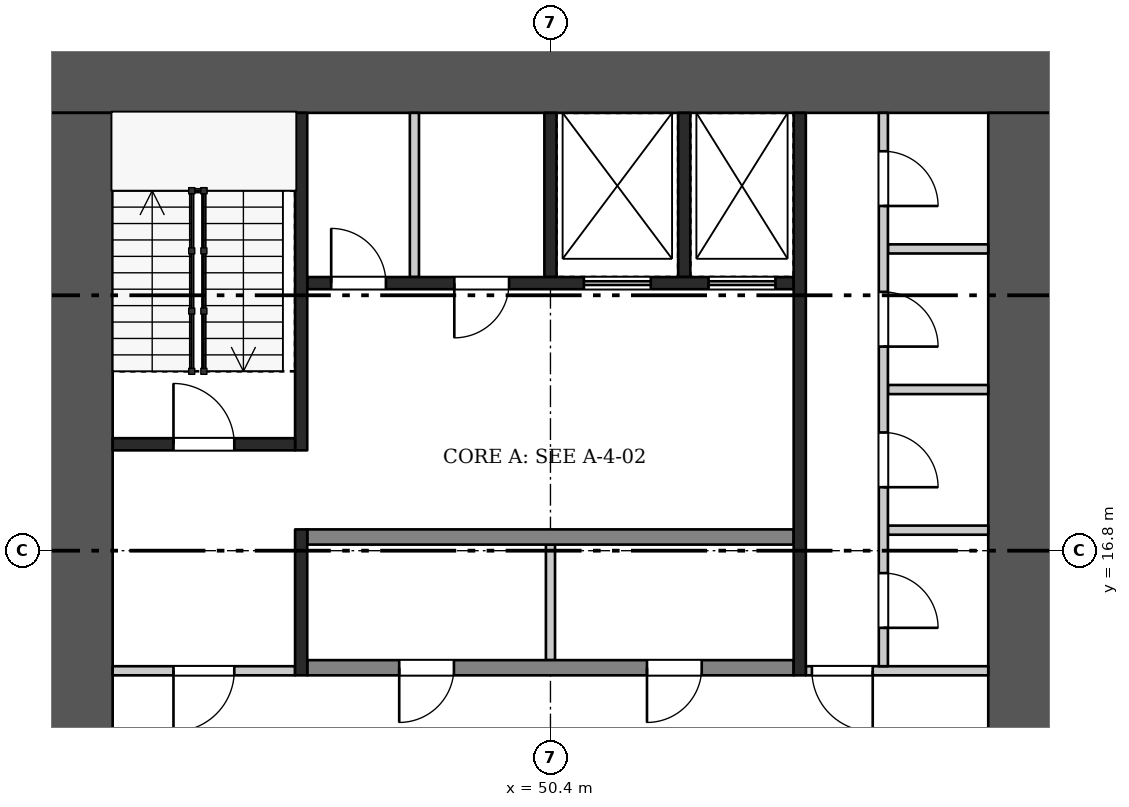
"""IFC4 building model, lengths in metres.
Left out: names, types, materials, properties, quantities, classifications, styles, units other than length and angle.
Written with IfcOpenShell. Run it as: python <this file> out.ifc"""

import sys

from ifc_helpers import new_model, si_unit, direction, frame, frame_2d, origin, place, context, subcontext, project, spatial, rectangle, extrude, element, fill, save


model = new_model("IFC4")
c1 = context("Model", 3, precision=1e-05, world=origin(), true_north=direction((0.0, 1.0)))
c2 = subcontext(c1, "Body", "Model", "MODEL_VIEW")
j1 = project(units=[si_unit("LENGTHUNIT", "METRE"), si_unit("PLANEANGLEUNIT", "RADIAN")], contexts=[c1])
p1 = place(None, origin())
s1 = spatial("IfcSite", under=j1, at=p1, CompositionType="ELEMENT")
p2 = place(p1, origin())
s2 = spatial("IfcBuilding", under=s1, at=p2, CompositionType="ELEMENT")
p3 = place(p2, frame((0.0, 0.0, -12.0)))
s3 = spatial("IfcBuildingStorey", under=s2, at=p3, CompositionType="ELEMENT", Elevation=-12.0)
p4 = place(p3, frame((42.0, 24.6, 0.0), z_axis=(0.0, 0.0, 1.0), x_axis=(1.0, 0.0, 0.0)))
e1 = element("IfcWall", 1, at=p4, inside=s3, PredefinedType="SHEAR", context=c2, shape_type="SweptSolid", body=[
    extrude(rectangle(XDim=16.8, YDim=1.2, at=frame_2d((8.4, 0.0))), origin(), (0.0, 0.0, 1.0), 3.7),
])
p5 = place(p3, frame((42.6, 9.6, 0.0), z_axis=(0.0, 0.0, 1.0), x_axis=(0.0, 1.0, 0.0)))
e2 = element("IfcWall", 2, at=p5, inside=s3, PredefinedType="SHEAR", context=c2, shape_type="SweptSolid", body=[
    extrude(rectangle(XDim=14.4, YDim=1.2, at=frame_2d((7.2, 0.0))), origin(), (0.0, 0.0, 1.0), 3.7),
])
p6 = place(p5, frame((2.1, 0.0, 0.0)))
e3 = element("IfcOpeningElement", 3, at=p6, cuts=e2, PredefinedType="OPENING", context=c2, shape_type="SweptSolid", body=[
    extrude(rectangle(XDim=1.8, YDim=2.1, at=frame_2d((0.9, 1.05))), frame((0.0, 0.61, 0.0), z_axis=(0.0, -1.0, 0.0), x_axis=(1.0, 0.0, 0.0)), (0.0, 0.0, 1.0), 1.22),
])
p7 = place(p3, frame((58.2, 9.6, 0.0), z_axis=(0.0, 0.0, 1.0), x_axis=(0.0, 1.0, 0.0)))
e4 = element("IfcWall", 4, at=p7, inside=s3, PredefinedType="SHEAR", context=c2, shape_type="SweptSolid", body=[
    extrude(rectangle(XDim=14.4, YDim=1.2, at=frame_2d((7.2, 0.0))), origin(), (0.0, 0.0, 1.0), 3.7),
])
p8 = place(p7, frame((2.1, 0.0, 0.0)))
e5 = element("IfcOpeningElement", 5, at=p8, cuts=e4, PredefinedType="OPENING", context=c2, shape_type="SweptSolid", body=[
    extrude(rectangle(XDim=1.8, YDim=2.1, at=frame_2d((0.9, 1.05))), frame((0.0, 0.61, 0.0), z_axis=(0.0, -1.0, 0.0), x_axis=(1.0, 0.0, 0.0)), (0.0, 0.0, 1.0), 1.22),
])
p9 = place(p3, frame((50.4, 15.0, 0.0), z_axis=(0.0, 0.0, 1.0), x_axis=(0.0, 1.0, 0.0)))
e6 = element("IfcWall", 6, at=p9, inside=s3, PredefinedType="PARTITIONING", context=c2, shape_type="SweptSolid", body=[
    extrude(rectangle(XDim=1.9, YDim=0.15, at=frame_2d((0.95, 0.0))), origin(), (0.0, 0.0, 1.0), 3.7),
])
p10 = place(p3, frame((46.4, 14.875, 0.0), z_axis=(0.0, 0.0, 1.0), x_axis=(1.0, 0.0, 0.0)))
e7 = element("IfcWall", 7, at=p10, inside=s3, PredefinedType="SHEAR", context=c2, shape_type="SweptSolid", body=[
    extrude(rectangle(XDim=8.0, YDim=0.25, at=frame_2d((4.0, 0.0))), origin(), (0.0, 0.0, 1.0), 3.7),
])
p11 = place(p10, frame((1.512, 0.0, 0.0)))
e8 = element("IfcOpeningElement", 8, at=p11, cuts=e7, PredefinedType="OPENING", context=c2, shape_type="SweptSolid", body=[
    extrude(rectangle(XDim=0.9, YDim=2.1, at=frame_2d((0.45, 1.05))), frame((0.0, 0.135, 0.0), z_axis=(0.0, -1.0, 0.0), x_axis=(1.0, 0.0, 0.0)), (0.0, 0.0, 1.0), 0.27),
])
p12 = place(p10, frame((5.587, 0.0, 0.0)))
e9 = element("IfcOpeningElement", 9, at=p12, cuts=e7, PredefinedType="OPENING", context=c2, shape_type="SweptSolid", body=[
    extrude(rectangle(XDim=0.9, YDim=2.1, at=frame_2d((0.45, 1.05))), frame((0.0, 0.135, 0.0), z_axis=(0.0, -1.0, 0.0), x_axis=(1.0, 0.0, 0.0)), (0.0, 0.0, 1.0), 0.27),
])
p13 = place(p3, frame((46.4, 17.025, 0.0), z_axis=(0.0, 0.0, 1.0), x_axis=(1.0, 0.0, 0.0)))
e10 = element("IfcWall", 10, at=p13, inside=s3, PredefinedType="SHEAR", context=c2, shape_type="SweptSolid", body=[
    extrude(rectangle(XDim=8.0, YDim=0.25, at=frame_2d((4.0, 0.0))), origin(), (0.0, 0.0, 1.0), 3.7),
])
for number, where, z_axis, x_axis in (
    (11, (50.4, 21.3, 0.0), (0.0, 0.0, 1.0), (0.0, 1.0, 0.0)),
    (12, (52.6, 21.3, 0.0), (0.0, 0.0, 1.0), (0.0, 1.0, 0.0)),
):
    element("IfcWall", number, at=place(p3, frame(where, z_axis=z_axis, x_axis=x_axis)), inside=s3, PredefinedType="SHEAR", context=c2, shape_type="SweptSolid", body=[
        extrude(rectangle(XDim=2.7, YDim=0.2, at=frame_2d((1.35, 0.0))), origin(), (0.0, 0.0, 1.0), 3.7),
    ])
p14 = place(p3, frame((48.163, 21.3, 0.0), z_axis=(0.0, 0.0, 1.0), x_axis=(0.0, 1.0, 0.0)))
e13 = element("IfcWall", 13, at=p14, inside=s3, PredefinedType="PARTITIONING", context=c2, shape_type="SweptSolid", body=[
    extrude(rectangle(XDim=2.7, YDim=0.15, at=frame_2d((1.35, 0.0))), origin(), (0.0, 0.0, 1.0), 3.7),
])
p15 = place(p3, frame((46.4, 21.2, 0.0), z_axis=(0.0, 0.0, 1.0), x_axis=(1.0, 0.0, 0.0)))
e14 = element("IfcWall", 14, at=p15, inside=s3, PredefinedType="SHEAR", context=c2, shape_type="SweptSolid", body=[
    extrude(rectangle(XDim=8.0, YDim=0.2, at=frame_2d((4.0, 0.0))), origin(), (0.0, 0.0, 1.0), 3.7),
])
p16 = place(p15, frame((0.394, 0.0, 0.0)))
e15 = element("IfcOpeningElement", 15, at=p16, cuts=e14, PredefinedType="OPENING", context=c2, shape_type="SweptSolid", body=[
    extrude(rectangle(XDim=0.9, YDim=2.1, at=frame_2d((0.45, 1.05))), frame((0.0, 0.11, 0.0), z_axis=(0.0, -1.0, 0.0), x_axis=(1.0, 0.0, 0.0)), (0.0, 0.0, 1.0), 0.22),
])
p17 = place(p15, frame((2.419, 0.0, 0.0)))
e16 = element("IfcOpeningElement", 16, at=p17, cuts=e14, PredefinedType="OPENING", context=c2, shape_type="SweptSolid", body=[
    extrude(rectangle(XDim=0.9, YDim=2.1, at=frame_2d((0.45, 1.05))), frame((0.0, 0.11, 0.0), z_axis=(0.0, -1.0, 0.0), x_axis=(1.0, 0.0, 0.0)), (0.0, 0.0, 1.0), 0.22),
])
p18 = place(p15, frame((4.55, 0.0, 0.0)))
e17 = element("IfcOpeningElement", 17, at=p18, cuts=e14, PredefinedType="OPENING", context=c2, shape_type="SweptSolid", body=[
    extrude(rectangle(XDim=1.1, YDim=2.1, at=frame_2d((0.55, 1.05))), frame((0.0, 0.11, 0.0), z_axis=(0.0, -1.0, 0.0), x_axis=(1.0, 0.0, 0.0)), (0.0, 0.0, 1.0), 0.22),
])
p19 = place(p15, frame((6.6, 0.0, 0.0)))
e18 = element("IfcOpeningElement", 18, at=p19, cuts=e14, PredefinedType="OPENING", context=c2, shape_type="SweptSolid", body=[
    extrude(rectangle(XDim=1.1, YDim=2.1, at=frame_2d((0.55, 1.05))), frame((0.0, 0.11, 0.0), z_axis=(0.0, -1.0, 0.0), x_axis=(1.0, 0.0, 0.0)), (0.0, 0.0, 1.0), 0.22),
])
p20 = place(p3, frame((46.3, 14.75, 0.0), z_axis=(0.0, 0.0, 1.0), x_axis=(0.0, 1.0, 0.0)))
e19 = element("IfcWall", 19, at=p20, inside=s3, PredefinedType="SHEAR", context=c2, shape_type="SweptSolid", body=[
    extrude(rectangle(XDim=2.4, YDim=0.2, at=frame_2d((1.2, 0.0))), origin(), (0.0, 0.0, 1.0), 3.7),
])
p21 = place(p3, frame((46.3, 18.45, 0.0), z_axis=(0.0, 0.0, 1.0), x_axis=(0.0, 1.0, 0.0)))
e20 = element("IfcWall", 20, at=p21, inside=s3, PredefinedType="SHEAR", context=c2, shape_type="SweptSolid", body=[
    extrude(rectangle(XDim=5.55, YDim=0.2, at=frame_2d((2.775, 0.0))), origin(), (0.0, 0.0, 1.0), 3.7),
])
p22 = place(p3, frame((43.2, 14.825, 0.0), z_axis=(0.0, 0.0, 1.0), x_axis=(1.0, 0.0, 0.0)))
e21 = element("IfcWall", 21, at=p22, inside=s3, PredefinedType="PARTITIONING", context=c2, shape_type="SweptSolid", body=[
    extrude(rectangle(XDim=3.0, YDim=0.15, at=frame_2d((1.5, 0.0))), origin(), (0.0, 0.0, 1.0), 3.7),
])
p23 = place(p22, frame((1.0, 0.0, 0.0)))
e22 = element("IfcOpeningElement", 22, at=p23, cuts=e21, PredefinedType="OPENING", context=c2, shape_type="SweptSolid", body=[
    extrude(rectangle(XDim=1.0, YDim=2.1, at=frame_2d((0.5, 1.05))), frame((0.0, 0.085, 0.0), z_axis=(0.0, -1.0, 0.0), x_axis=(1.0, 0.0, 0.0)), (0.0, 0.0, 1.0), 0.17),
])
p24 = place(p3, frame((43.2, 18.55, 0.0), z_axis=(0.0, 0.0, 1.0), x_axis=(1.0, 0.0, 0.0)))
e23 = element("IfcWall", 23, at=p24, inside=s3, PredefinedType="SHEAR", context=c2, shape_type="SweptSolid", body=[
    extrude(rectangle(XDim=3.0, YDim=0.2, at=frame_2d((1.5, 0.0))), origin(), (0.0, 0.0, 1.0), 3.7),
])
p25 = place(p24, frame((1.0, 0.0, 0.0)))
e24 = element("IfcOpeningElement", 24, at=p25, cuts=e23, PredefinedType="OPENING", context=c2, shape_type="SweptSolid", body=[
    extrude(rectangle(XDim=1.0, YDim=2.1, at=frame_2d((0.5, 1.05))), frame((0.0, 0.11, 0.0), z_axis=(0.0, -1.0, 0.0), x_axis=(1.0, 0.0, 0.0)), (0.0, 0.0, 1.0), 0.22),
])
p26 = place(p3, frame((54.5, 14.75, 0.0), z_axis=(0.0, 0.0, 1.0), x_axis=(0.0, 1.0, 0.0)))
e25 = element("IfcWall", 25, at=p26, inside=s3, PredefinedType="SHEAR", context=c2, shape_type="SweptSolid", body=[
    extrude(rectangle(XDim=9.25, YDim=0.2, at=frame_2d((4.625, 0.0))), origin(), (0.0, 0.0, 1.0), 3.7),
])
p27 = place(p3, frame((54.6, 14.825, 0.0), z_axis=(0.0, 0.0, 1.0), x_axis=(1.0, 0.0, 0.0)))
e26 = element("IfcWall", 26, at=p27, inside=s3, PredefinedType="PARTITIONING", context=c2, shape_type="SweptSolid", body=[
    extrude(rectangle(XDim=3.0, YDim=0.15, at=frame_2d((1.5, 0.0))), origin(), (0.0, 0.0, 1.0), 3.7),
])
p28 = place(p27, frame((0.1, 0.0, 0.0)))
e27 = element("IfcOpeningElement", 27, at=p28, cuts=e26, PredefinedType="OPENING", context=c2, shape_type="SweptSolid", body=[
    extrude(rectangle(XDim=1.0, YDim=2.1, at=frame_2d((0.5, 1.05))), frame((0.0, 0.085, 0.0), z_axis=(0.0, -1.0, 0.0), x_axis=(1.0, 0.0, 0.0)), (0.0, 0.0, 1.0), 0.17),
])
for number, where, z_axis, x_axis in (
    (28, (55.95, 17.137, 0.0), (0.0, 0.0, 1.0), (1.0, 0.0, 0.0)),
    (29, (55.95, 19.45, 0.0), (0.0, 0.0, 1.0), (1.0, 0.0, 0.0)),
    (30, (55.95, 21.762, 0.0), (0.0, 0.0, 1.0), (1.0, 0.0, 0.0)),
):
    element("IfcWall", number, at=place(p3, frame(where, z_axis=z_axis, x_axis=x_axis)), inside=s3, PredefinedType="PARTITIONING", context=c2, shape_type="SweptSolid", body=[
        extrude(rectangle(XDim=1.65, YDim=0.15, at=frame_2d((0.825, 0.0))), origin(), (0.0, 0.0, 1.0), 3.7),
    ])
p29 = place(p3, frame((55.875, 14.9, 0.0), z_axis=(0.0, 0.0, 1.0), x_axis=(0.0, 1.0, 0.0)))
e31 = element("IfcWall", 31, at=p29, inside=s3, PredefinedType="PARTITIONING", context=c2, shape_type="SweptSolid", body=[
    extrude(rectangle(XDim=9.1, YDim=0.15, at=frame_2d((4.55, 0.0))), origin(), (0.0, 0.0, 1.0), 3.7),
])
p30 = place(p29, frame((0.631, 0.0, 0.0)))
e32 = element("IfcOpeningElement", 32, at=p30, cuts=e31, PredefinedType="OPENING", context=c2, shape_type="SweptSolid", body=[
    extrude(rectangle(XDim=0.9, YDim=2.1, at=frame_2d((0.45, 1.05))), frame((0.0, 0.085, 0.0), z_axis=(0.0, -1.0, 0.0), x_axis=(1.0, 0.0, 0.0)), (0.0, 0.0, 1.0), 0.17),
])
p31 = place(p29, frame((2.944, 0.0, 0.0)))
e33 = element("IfcOpeningElement", 33, at=p31, cuts=e31, PredefinedType="OPENING", context=c2, shape_type="SweptSolid", body=[
    extrude(rectangle(XDim=0.9, YDim=2.1, at=frame_2d((0.45, 1.05))), frame((0.0, 0.085, 0.0), z_axis=(0.0, -1.0, 0.0), x_axis=(1.0, 0.0, 0.0)), (0.0, 0.0, 1.0), 0.17),
])
p32 = place(p29, frame((5.256, 0.0, 0.0)))
e34 = element("IfcOpeningElement", 34, at=p32, cuts=e31, PredefinedType="OPENING", context=c2, shape_type="SweptSolid", body=[
    extrude(rectangle(XDim=0.9, YDim=2.1, at=frame_2d((0.45, 1.05))), frame((0.0, 0.085, 0.0), z_axis=(0.0, -1.0, 0.0), x_axis=(1.0, 0.0, 0.0)), (0.0, 0.0, 1.0), 0.17),
])
p33 = place(p29, frame((7.569, 0.0, 0.0)))
e35 = element("IfcOpeningElement", 35, at=p33, cuts=e31, PredefinedType="OPENING", context=c2, shape_type="SweptSolid", body=[
    extrude(rectangle(XDim=0.9, YDim=2.1, at=frame_2d((0.45, 1.05))), frame((0.0, 0.085, 0.0), z_axis=(0.0, -1.0, 0.0), x_axis=(1.0, 0.0, 0.0)), (0.0, 0.0, 1.0), 0.17),
])
p34 = place(p11, frame((0.9, 0.0, 0.0), z_axis=(0.0, 0.0, 1.0), x_axis=(-1.0, 0.0, 0.0)))
e36 = element("IfcDoor", 36, at=p34, inside=s3, OperationType="SINGLE_SWING_RIGHT", PredefinedType="DOOR", context=c2, shape_type="SweptSolid", body=[
    extrude(rectangle(XDim=0.9, YDim=2.1, at=frame_2d((0.45, 1.05))), frame((0.0, 0.025, 0.0), z_axis=(0.0, -1.0, 0.0), x_axis=(1.0, 0.0, 0.0)), (0.0, 0.0, 1.0), 0.05),
])
fill(e8, e36)
p35 = place(p12, frame((0.9, 0.0, 0.0), z_axis=(0.0, 0.0, 1.0), x_axis=(-1.0, 0.0, 0.0)))
e37 = element("IfcDoor", 37, at=p35, inside=s3, OperationType="SINGLE_SWING_RIGHT", PredefinedType="DOOR", context=c2, shape_type="SweptSolid", body=[
    extrude(rectangle(XDim=0.9, YDim=2.1, at=frame_2d((0.45, 1.05))), frame((0.0, 0.025, 0.0), z_axis=(0.0, -1.0, 0.0), x_axis=(1.0, 0.0, 0.0)), (0.0, 0.0, 1.0), 0.05),
])
fill(e9, e37)
p36 = place(p16, origin())
e38 = element("IfcDoor", 38, at=p36, inside=s3, OperationType="SINGLE_SWING_LEFT", PredefinedType="DOOR", context=c2, shape_type="SweptSolid", body=[
    extrude(rectangle(XDim=0.9, YDim=2.1, at=frame_2d((0.45, 1.05))), frame((0.0, 0.025, 0.0), z_axis=(0.0, -1.0, 0.0), x_axis=(1.0, 0.0, 0.0)), (0.0, 0.0, 1.0), 0.05),
])
fill(e15, e38)
p37 = place(p17, frame((0.9, 0.0, 0.0), z_axis=(0.0, 0.0, 1.0), x_axis=(-1.0, 0.0, 0.0)))
e39 = element("IfcDoor", 39, at=p37, inside=s3, OperationType="SINGLE_SWING_RIGHT", PredefinedType="DOOR", context=c2, shape_type="SweptSolid", body=[
    extrude(rectangle(XDim=0.9, YDim=2.1, at=frame_2d((0.45, 1.05))), frame((0.0, 0.025, 0.0), z_axis=(0.0, -1.0, 0.0), x_axis=(1.0, 0.0, 0.0)), (0.0, 0.0, 1.0), 0.05),
])
fill(e16, e39)
p38 = place(p18, origin())
e40 = element("IfcDoor", 40, at=p38, inside=s3, OperationType="DOUBLE_DOOR_SLIDING", PredefinedType="DOOR", context=c2, shape_type="SweptSolid", body=[
    extrude(rectangle(XDim=1.1, YDim=2.1, at=frame_2d((0.55, 1.05))), frame((0.0, 0.025, 0.0), z_axis=(0.0, -1.0, 0.0), x_axis=(1.0, 0.0, 0.0)), (0.0, 0.0, 1.0), 0.05),
])
fill(e17, e40)
p39 = place(p19, origin())
e41 = element("IfcDoor", 41, at=p39, inside=s3, OperationType="DOUBLE_DOOR_SLIDING", PredefinedType="DOOR", context=c2, shape_type="SweptSolid", body=[
    extrude(rectangle(XDim=1.1, YDim=2.1, at=frame_2d((0.55, 1.05))), frame((0.0, 0.025, 0.0), z_axis=(0.0, -1.0, 0.0), x_axis=(1.0, 0.0, 0.0)), (0.0, 0.0, 1.0), 0.05),
])
fill(e18, e41)
p40 = place(p23, frame((1.0, 0.0, 0.0), z_axis=(0.0, 0.0, 1.0), x_axis=(-1.0, 0.0, 0.0)))
e42 = element("IfcDoor", 42, at=p40, inside=s3, OperationType="SINGLE_SWING_RIGHT", PredefinedType="DOOR", context=c2, shape_type="SweptSolid", body=[
    extrude(rectangle(XDim=1.0, YDim=2.1, at=frame_2d((0.5, 1.05))), frame((0.0, 0.025, 0.0), z_axis=(0.0, -1.0, 0.0), x_axis=(1.0, 0.0, 0.0)), (0.0, 0.0, 1.0), 0.05),
])
fill(e22, e42)
p41 = place(p25, origin())
e43 = element("IfcDoor", 43, at=p41, inside=s3, OperationType="SINGLE_SWING_LEFT", PredefinedType="DOOR", context=c2, shape_type="SweptSolid", body=[
    extrude(rectangle(XDim=1.0, YDim=2.1, at=frame_2d((0.5, 1.05))), frame((0.0, 0.025, 0.0), z_axis=(0.0, -1.0, 0.0), x_axis=(1.0, 0.0, 0.0)), (0.0, 0.0, 1.0), 0.05),
])
fill(e24, e43)
p42 = place(p28, frame((1.0, 0.0, 0.0), z_axis=(0.0, 0.0, 1.0), x_axis=(-1.0, 0.0, 0.0)))
e44 = element("IfcDoor", 44, at=p42, inside=s3, OperationType="SINGLE_SWING_LEFT", PredefinedType="DOOR", context=c2, shape_type="SweptSolid", body=[
    extrude(rectangle(XDim=1.0, YDim=2.1, at=frame_2d((0.5, 1.05))), frame((0.0, 0.025, 0.0), z_axis=(0.0, -1.0, 0.0), x_axis=(1.0, 0.0, 0.0)), (0.0, 0.0, 1.0), 0.05),
])
fill(e27, e44)
p43 = place(p30, frame((0.9, 0.0, 0.0), z_axis=(0.0, 0.0, 1.0), x_axis=(-1.0, 0.0, 0.0)))
e45 = element("IfcDoor", 45, at=p43, inside=s3, OperationType="SINGLE_SWING_RIGHT", PredefinedType="DOOR", context=c2, shape_type="SweptSolid", body=[
    extrude(rectangle(XDim=0.9, YDim=2.1, at=frame_2d((0.45, 1.05))), frame((0.0, 0.025, 0.0), z_axis=(0.0, -1.0, 0.0), x_axis=(1.0, 0.0, 0.0)), (0.0, 0.0, 1.0), 0.05),
])
fill(e32, e45)
p44 = place(p31, frame((0.9, 0.0, 0.0), z_axis=(0.0, 0.0, 1.0), x_axis=(-1.0, 0.0, 0.0)))
e46 = element("IfcDoor", 46, at=p44, inside=s3, OperationType="SINGLE_SWING_RIGHT", PredefinedType="DOOR", context=c2, shape_type="SweptSolid", body=[
    extrude(rectangle(XDim=0.9, YDim=2.1, at=frame_2d((0.45, 1.05))), frame((0.0, 0.025, 0.0), z_axis=(0.0, -1.0, 0.0), x_axis=(1.0, 0.0, 0.0)), (0.0, 0.0, 1.0), 0.05),
])
fill(e33, e46)
p45 = place(p32, frame((0.9, 0.0, 0.0), z_axis=(0.0, 0.0, 1.0), x_axis=(-1.0, 0.0, 0.0)))
e47 = element("IfcDoor", 47, at=p45, inside=s3, OperationType="SINGLE_SWING_RIGHT", PredefinedType="DOOR", context=c2, shape_type="SweptSolid", body=[
    extrude(rectangle(XDim=0.9, YDim=2.1, at=frame_2d((0.45, 1.05))), frame((0.0, 0.025, 0.0), z_axis=(0.0, -1.0, 0.0), x_axis=(1.0, 0.0, 0.0)), (0.0, 0.0, 1.0), 0.05),
])
fill(e34, e47)
p46 = place(p33, frame((0.9, 0.0, 0.0), z_axis=(0.0, 0.0, 1.0), x_axis=(-1.0, 0.0, 0.0)))
e48 = element("IfcDoor", 48, at=p46, inside=s3, OperationType="SINGLE_SWING_RIGHT", PredefinedType="DOOR", context=c2, shape_type="SweptSolid", body=[
    extrude(rectangle(XDim=0.9, YDim=2.1, at=frame_2d((0.45, 1.05))), frame((0.0, 0.025, 0.0), z_axis=(0.0, -1.0, 0.0), x_axis=(1.0, 0.0, 0.0)), (0.0, 0.0, 1.0), 0.05),
])
fill(e35, e48)
save(model, sys.argv[1])
